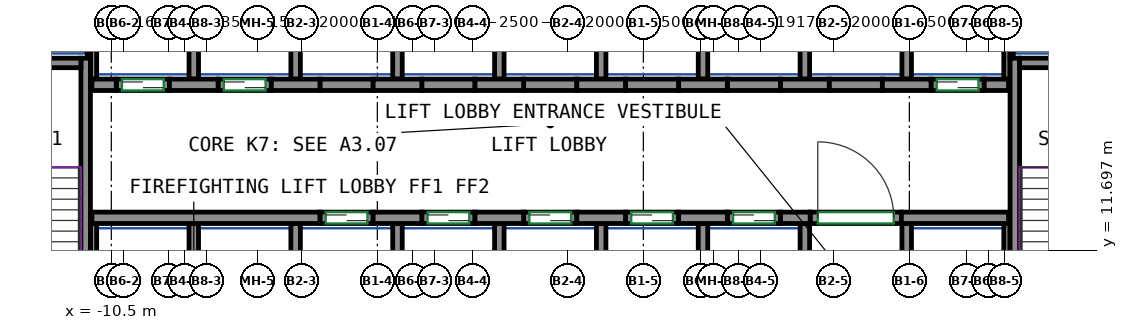
"""IFC4 building model, lengths in metres.
Left out: names, types, materials, properties, quantities, classifications, styles, units other than length and angle.
Written with IfcOpenShell. Run it as: python <this file> out.ifc"""

import sys

from ifc_helpers import new_model, si_unit, direction, frame, frame_2d, origin, place, context, subcontext, project, spatial, rectangle, extrude, source, transform, mapped, element, fill, save


model = new_model("IFC4")
c1 = context("Model", 3, precision=1e-05, world=origin(), true_north=direction((0.0, 1.0)))
c2 = subcontext(c1, "Body", "Model", "MODEL_VIEW")
j1 = project(units=[si_unit("LENGTHUNIT", "METRE"), si_unit("PLANEANGLEUNIT", "RADIAN")], contexts=[c1])
p1 = place(None, origin())
s1 = spatial("IfcSite", under=j1, at=p1, CompositionType="ELEMENT")
p2 = place(p1, origin())
s2 = spatial("IfcBuilding", under=s1, at=p2, CompositionType="ELEMENT")
p3 = place(p2, frame((0.0, 0.0, 31.0)))
s3 = spatial("IfcBuildingStorey", under=s2, at=p3, CompositionType="ELEMENT", Elevation=31.0)
m1 = source(origin(), c2, "Body", "SweptSolid", [
    extrude(rectangle(XDim=7.75, YDim=0.25, at=frame_2d((3.875, 0.0))), origin(), (0.0, 0.0, 1.0), 3.72),
])
p4 = place(p3, frame((-11.175, 9.0, 0.0), z_axis=(0.0, 0.0, 1.0), x_axis=(0.0, 1.0, 0.0)))
e1 = element("IfcWall", 1, at=p4, inside=s3, PredefinedType="SHEAR", context=c2, shape_type="MappedRepresentation", body=[
    mapped(m1, transform((0.0, 0.0, 0.0))),
])
m2 = source(origin(), c2, "Body", "SweptSolid", [
    extrude(rectangle(XDim=3.7, YDim=0.25, at=frame_2d((1.85, 0.0))), origin(), (0.0, 0.0, 1.0), 3.72),
])
p5 = place(p3, frame((-15.0, 16.625, 0.0), z_axis=(0.0, 0.0, 1.0), x_axis=(1.0, 0.0, 0.0)))
e2 = element("IfcWall", 2, at=p5, inside=s3, PredefinedType="SHEAR", context=c2, shape_type="MappedRepresentation", body=[
    mapped(m2, transform((0.0, 0.0, 0.0))),
])
p6 = place(p3, frame((13.275, 9.0, 0.0), z_axis=(0.0, 0.0, 1.0), x_axis=(0.0, 1.0, 0.0)))
e3 = element("IfcWall", 3, at=p6, inside=s3, PredefinedType="SHEAR", context=c2, shape_type="MappedRepresentation", body=[
    mapped(m1, transform((0.0, 0.0, 0.0))),
])
m3 = source(origin(), c2, "Body", "SweptSolid", [
    extrude(rectangle(XDim=3.7, YDim=0.25, at=frame_2d((1.85, 0.0))), origin(), (0.0, 0.0, 1.0), 3.72),
])
p7 = place(p3, frame((13.4, 16.625, 0.0), z_axis=(0.0, 0.0, 1.0), x_axis=(1.0, 0.0, 0.0)))
e4 = element("IfcWall", 4, at=p7, inside=s3, PredefinedType="SHEAR", context=c2, shape_type="MappedRepresentation", body=[
    mapped(m3, transform((0.0, 0.0, 0.0))),
])
m4 = source(origin(), c2, "Body", "SweptSolid", [
    extrude(rectangle(XDim=6.0, YDim=0.3, at=frame_2d((3.0, 0.0))), origin(), (0.0, 0.0, 1.0), 3.72),
])
p8 = place(p3, frame((-11.01, 12.55, 0.0), z_axis=(0.0, 0.0, 1.0), x_axis=(1.0, 0.0, 0.0)))
e5 = element("IfcWall", 5, at=p8, inside=s3, PredefinedType="SHEAR", context=c2, shape_type="MappedRepresentation", body=[
    mapped(m4, transform((0.0, 0.0, 0.0))),
])
m5 = source(origin(), c2, "Body", "SweptSolid", [
    extrude(rectangle(XDim=1.28, YDim=0.3, at=frame_2d((0.64, 0.0))), origin(), (0.0, 0.0, 1.0), 3.72),
])
for number, where, z_axis, x_axis in (
    (6, (-3.61, 12.55, 0.0), (0.0, 0.0, 1.0), (1.0, 0.0, 0.0)),
    (7, (-0.93, 12.55, 0.0), (0.0, 0.0, 1.0), (1.0, 0.0, 0.0)),
    (8, (1.75, 12.55, 0.0), (0.0, 0.0, 1.0), (1.0, 0.0, 0.0)),
    (9, (4.43, 12.55, 0.0), (0.0, 0.0, 1.0), (1.0, 0.0, 0.0)),
):
    element("IfcWall", number, at=place(p3, frame(where, z_axis=z_axis, x_axis=x_axis)), inside=s3, PredefinedType="SHEAR", context=c2, shape_type="MappedRepresentation", body=[
        mapped(m5, transform((0.0, 0.0, 0.0))),
    ])
m6 = source(origin(), c2, "Body", "SweptSolid", [
    extrude(rectangle(XDim=0.78, YDim=0.3, at=frame_2d((0.39, 0.0))), origin(), (0.0, 0.0, 1.0), 3.72),
])
p9 = place(p3, frame((7.11, 12.55, 0.0), z_axis=(0.0, 0.0, 1.0), x_axis=(1.0, 0.0, 0.0)))
e10 = element("IfcWall", 10, at=p9, inside=s3, PredefinedType="SHEAR", context=c2, shape_type="MappedRepresentation", body=[
    mapped(m6, transform((0.0, 0.0, 0.0))),
])
m7 = source(origin(), c2, "Body", "SweptSolid", [
    extrude(rectangle(XDim=2.82, YDim=0.3, at=frame_2d((1.41, 0.0))), origin(), (0.0, 0.0, 1.0), 3.72),
])
p10 = place(p3, frame((10.29, 12.55, 0.0), z_axis=(0.0, 0.0, 1.0), x_axis=(1.0, 0.0, 0.0)))
e11 = element("IfcWall", 11, at=p10, inside=s3, PredefinedType="SHEAR", context=c2, shape_type="MappedRepresentation", body=[
    mapped(m7, transform((0.0, 0.0, 0.0))),
])
m8 = source(origin(), c2, "Body", "SweptSolid", [
    extrude(rectangle(XDim=0.64, YDim=0.3, at=frame_2d((0.32, 0.0))), origin(), (0.0, 0.0, 1.0), 3.72),
])
p11 = place(p3, frame((-11.01, 16.05, 0.0), z_axis=(0.0, 0.0, 1.0), x_axis=(1.0, 0.0, 0.0)))
e12 = element("IfcWall", 12, at=p11, inside=s3, PredefinedType="SHEAR", context=c2, shape_type="MappedRepresentation", body=[
    mapped(m8, transform((0.0, 0.0, 0.0))),
])
for number, where, z_axis, x_axis in (
    (13, (-8.97, 16.05, 0.0), (0.0, 0.0, 1.0), (1.0, 0.0, 0.0)),
    (14, (-6.29, 16.05, 0.0), (0.0, 0.0, 1.0), (1.0, 0.0, 0.0)),
    (15, (-3.61, 16.05, 0.0), (0.0, 0.0, 1.0), (1.0, 0.0, 0.0)),
    (16, (-0.93, 16.05, 0.0), (0.0, 0.0, 1.0), (1.0, 0.0, 0.0)),
    (17, (1.75, 16.05, 0.0), (0.0, 0.0, 1.0), (1.0, 0.0, 0.0)),
    (18, (4.43, 16.05, 0.0), (0.0, 0.0, 1.0), (1.0, 0.0, 0.0)),
):
    element("IfcWall", number, at=place(p3, frame(where, z_axis=z_axis, x_axis=x_axis)), inside=s3, PredefinedType="SHEAR", context=c2, shape_type="MappedRepresentation", body=[
        mapped(m5, transform((0.0, 0.0, 0.0))),
    ])
m9 = source(origin(), c2, "Body", "SweptSolid", [
    extrude(rectangle(XDim=1.28, YDim=0.3, at=frame_2d((0.64, 0.0))), origin(), (0.0, 0.0, 1.0), 3.72),
])
p12 = place(p3, frame((7.11, 16.05, 0.0), z_axis=(0.0, 0.0, 1.0), x_axis=(1.0, 0.0, 0.0)))
e19 = element("IfcWall", 19, at=p12, inside=s3, PredefinedType="SHEAR", context=c2, shape_type="MappedRepresentation", body=[
    mapped(m9, transform((0.0, 0.0, 0.0))),
])
p13 = place(p3, frame((9.79, 16.05, 0.0), z_axis=(0.0, 0.0, 1.0), x_axis=(1.0, 0.0, 0.0)))
e20 = element("IfcWall", 20, at=p13, inside=s3, PredefinedType="SHEAR", context=c2, shape_type="MappedRepresentation", body=[
    mapped(m5, transform((0.0, 0.0, 0.0))),
])
m10 = source(origin(), c2, "Body", "SweptSolid", [
    extrude(rectangle(XDim=0.64, YDim=0.3, at=frame_2d((0.32, 0.0))), origin(), (0.0, 0.0, 1.0), 3.72),
])
p14 = place(p3, frame((12.47, 16.05, 0.0), z_axis=(0.0, 0.0, 1.0), x_axis=(1.0, 0.0, 0.0)))
e21 = element("IfcWall", 21, at=p14, inside=s3, PredefinedType="SHEAR", context=c2, shape_type="MappedRepresentation", body=[
    mapped(m10, transform((0.0, 0.0, 0.0))),
])
m11 = source(origin(), c2, "Body", "SweptSolid", [
    extrude(rectangle(XDim=1.4, YDim=0.3, at=frame_2d((0.7, 0.0))), origin(), (0.0, 0.0, 1.0), 3.72),
])
p15 = place(p3, frame((-5.01, 12.55, 0.0), z_axis=(0.0, 0.0, 1.0), x_axis=(1.0, 0.0, 0.0)))
e22 = element("IfcWall", 22, at=p15, inside=s3, PredefinedType="PARTITIONING", context=c2, shape_type="MappedRepresentation", body=[
    mapped(m11, transform((0.0, 0.0, 0.0))),
])
p16 = place(p15, frame((0.15, 0.0, 0.0)))
e23 = element("IfcOpeningElement", 23, at=p16, cuts=e22, PredefinedType="OPENING", context=c2, shape_type="SweptSolid", body=[
    extrude(rectangle(XDim=1.1, YDim=2.1, at=frame_2d((0.55, 1.05))), frame((0.0, 0.16, 0.0), z_axis=(0.0, -1.0, 0.0), x_axis=(1.0, 0.0, 0.0)), (0.0, 0.0, 1.0), 0.32),
])
m12 = source(origin(), c2, "Body", "SweptSolid", [
    extrude(rectangle(XDim=1.4, YDim=0.3, at=frame_2d((0.7, 0.0))), origin(), (0.0, 0.0, 1.0), 3.72),
])
p17 = place(p3, frame((-2.33, 12.55, 0.0), z_axis=(0.0, 0.0, 1.0), x_axis=(1.0, 0.0, 0.0)))
e24 = element("IfcWall", 24, at=p17, inside=s3, PredefinedType="PARTITIONING", context=c2, shape_type="MappedRepresentation", body=[
    mapped(m12, transform((0.0, 0.0, 0.0))),
])
p18 = place(p17, frame((0.15, 0.0, 0.0)))
e25 = element("IfcOpeningElement", 25, at=p18, cuts=e24, PredefinedType="OPENING", context=c2, shape_type="SweptSolid", body=[
    extrude(rectangle(XDim=1.1, YDim=2.1, at=frame_2d((0.55, 1.05))), frame((0.0, 0.16, 0.0), z_axis=(0.0, -1.0, 0.0), x_axis=(1.0, 0.0, 0.0)), (0.0, 0.0, 1.0), 0.32),
])
p19 = place(p3, frame((0.35, 12.55, 0.0), z_axis=(0.0, 0.0, 1.0), x_axis=(1.0, 0.0, 0.0)))
e26 = element("IfcWall", 26, at=p19, inside=s3, PredefinedType="PARTITIONING", context=c2, shape_type="MappedRepresentation", body=[
    mapped(m11, transform((0.0, 0.0, 0.0))),
])
p20 = place(p19, frame((0.15, 0.0, 0.0)))
e27 = element("IfcOpeningElement", 27, at=p20, cuts=e26, PredefinedType="OPENING", context=c2, shape_type="SweptSolid", body=[
    extrude(rectangle(XDim=1.1, YDim=2.1, at=frame_2d((0.55, 1.05))), frame((0.0, 0.16, 0.0), z_axis=(0.0, -1.0, 0.0), x_axis=(1.0, 0.0, 0.0)), (0.0, 0.0, 1.0), 0.32),
])
p21 = place(p3, frame((3.03, 12.55, 0.0), z_axis=(0.0, 0.0, 1.0), x_axis=(1.0, 0.0, 0.0)))
e28 = element("IfcWall", 28, at=p21, inside=s3, PredefinedType="PARTITIONING", context=c2, shape_type="MappedRepresentation", body=[
    mapped(m11, transform((0.0, 0.0, 0.0))),
])
p22 = place(p21, frame((0.15, 0.0, 0.0)))
e29 = element("IfcOpeningElement", 29, at=p22, cuts=e28, PredefinedType="OPENING", context=c2, shape_type="SweptSolid", body=[
    extrude(rectangle(XDim=1.1, YDim=2.1, at=frame_2d((0.55, 1.05))), frame((0.0, 0.16, 0.0), z_axis=(0.0, -1.0, 0.0), x_axis=(1.0, 0.0, 0.0)), (0.0, 0.0, 1.0), 0.32),
])
p23 = place(p3, frame((5.71, 12.55, 0.0), z_axis=(0.0, 0.0, 1.0), x_axis=(1.0, 0.0, 0.0)))
e30 = element("IfcWall", 30, at=p23, inside=s3, PredefinedType="PARTITIONING", context=c2, shape_type="MappedRepresentation", body=[
    mapped(m12, transform((0.0, 0.0, 0.0))),
])
p24 = place(p23, frame((0.15, 0.0, 0.0)))
e31 = element("IfcOpeningElement", 31, at=p24, cuts=e30, PredefinedType="OPENING", context=c2, shape_type="SweptSolid", body=[
    extrude(rectangle(XDim=1.1, YDim=2.1, at=frame_2d((0.55, 1.05))), frame((0.0, 0.16, 0.0), z_axis=(0.0, -1.0, 0.0), x_axis=(1.0, 0.0, 0.0)), (0.0, 0.0, 1.0), 0.32),
])
p25 = place(p3, frame((11.07, 16.05, 0.0), z_axis=(0.0, 0.0, 1.0), x_axis=(1.0, 0.0, 0.0)))
e32 = element("IfcWall", 32, at=p25, inside=s3, PredefinedType="PARTITIONING", context=c2, shape_type="MappedRepresentation", body=[
    mapped(m11, transform((0.0, 0.0, 0.0))),
])
p26 = place(p25, frame((0.15, 0.0, 0.0)))
e33 = element("IfcOpeningElement", 33, at=p26, cuts=e32, PredefinedType="OPENING", context=c2, shape_type="SweptSolid", body=[
    extrude(rectangle(XDim=1.1, YDim=2.1, at=frame_2d((0.55, 1.05))), frame((0.0, 0.16, 0.0), z_axis=(0.0, -1.0, 0.0), x_axis=(1.0, 0.0, 0.0)), (0.0, 0.0, 1.0), 0.32),
])
p27 = place(p3, frame((-10.37, 16.05, 0.0), z_axis=(0.0, 0.0, 1.0), x_axis=(1.0, 0.0, 0.0)))
e34 = element("IfcWall", 34, at=p27, inside=s3, PredefinedType="PARTITIONING", context=c2, shape_type="MappedRepresentation", body=[
    mapped(m12, transform((0.0, 0.0, 0.0))),
])
p28 = place(p27, frame((0.15, 0.0, 0.0)))
e35 = element("IfcOpeningElement", 35, at=p28, cuts=e34, PredefinedType="OPENING", context=c2, shape_type="SweptSolid", body=[
    extrude(rectangle(XDim=1.1, YDim=2.1, at=frame_2d((0.55, 1.05))), frame((0.0, 0.16, 0.0), z_axis=(0.0, -1.0, 0.0), x_axis=(1.0, 0.0, 0.0)), (0.0, 0.0, 1.0), 0.32),
])
p29 = place(p3, frame((-7.69, 16.05, 0.0), z_axis=(0.0, 0.0, 1.0), x_axis=(1.0, 0.0, 0.0)))
e36 = element("IfcWall", 36, at=p29, inside=s3, PredefinedType="PARTITIONING", context=c2, shape_type="MappedRepresentation", body=[
    mapped(m11, transform((0.0, 0.0, 0.0))),
])
p30 = place(p29, frame((0.15, 0.0, 0.0)))
e37 = element("IfcOpeningElement", 37, at=p30, cuts=e36, PredefinedType="OPENING", context=c2, shape_type="SweptSolid", body=[
    extrude(rectangle(XDim=1.1, YDim=2.1, at=frame_2d((0.55, 1.05))), frame((0.0, 0.16, 0.0), z_axis=(0.0, -1.0, 0.0), x_axis=(1.0, 0.0, 0.0)), (0.0, 0.0, 1.0), 0.32),
])
m13 = source(origin(), c2, "Body", "SweptSolid", [
    extrude(rectangle(XDim=2.4, YDim=0.3, at=frame_2d((1.2, 0.0))), origin(), (0.0, 0.0, 1.0), 3.72),
])
p31 = place(p3, frame((7.89, 12.55, 0.0), z_axis=(0.0, 0.0, 1.0), x_axis=(1.0, 0.0, 0.0)))
e38 = element("IfcWall", 38, at=p31, inside=s3, PredefinedType="PARTITIONING", context=c2, shape_type="MappedRepresentation", body=[
    mapped(m13, transform((0.0, 0.0, 0.0))),
])
p32 = place(p31, frame((0.2, 0.0, 0.0)))
e39 = element("IfcOpeningElement", 39, at=p32, cuts=e38, PredefinedType="OPENING", context=c2, shape_type="SweptSolid", body=[
    extrude(rectangle(XDim=2.0, YDim=2.1, at=frame_2d((1.0, 1.05))), frame((0.0, 0.16, 0.0), z_axis=(0.0, -1.0, 0.0), x_axis=(1.0, 0.0, 0.0)), (0.0, 0.0, 1.0), 0.32),
])
p33 = place(p3, frame((-5.01, 16.05, 0.0), z_axis=(0.0, 0.0, 1.0), x_axis=(1.0, 0.0, 0.0)))
e40 = element("IfcWall", 40, at=p33, inside=s3, PredefinedType="PARTITIONING", context=c2, shape_type="MappedRepresentation", body=[
    mapped(m11, transform((0.0, 0.0, 0.0))),
])
p34 = place(p3, frame((-2.33, 16.05, 0.0), z_axis=(0.0, 0.0, 1.0), x_axis=(1.0, 0.0, 0.0)))
e41 = element("IfcWall", 41, at=p34, inside=s3, PredefinedType="PARTITIONING", context=c2, shape_type="MappedRepresentation", body=[
    mapped(m12, transform((0.0, 0.0, 0.0))),
])
for number, where, z_axis, x_axis in (
    (42, (0.35, 16.05, 0.0), (0.0, 0.0, 1.0), (1.0, 0.0, 0.0)),
    (43, (3.03, 16.05, 0.0), (0.0, 0.0, 1.0), (1.0, 0.0, 0.0)),
):
    element("IfcWall", number, at=place(p3, frame(where, z_axis=z_axis, x_axis=x_axis)), inside=s3, PredefinedType="PARTITIONING", context=c2, shape_type="MappedRepresentation", body=[
        mapped(m11, transform((0.0, 0.0, 0.0))),
    ])
for number, where, z_axis, x_axis in (
    (44, (5.71, 16.05, 0.0), (0.0, 0.0, 1.0), (1.0, 0.0, 0.0)),
    (45, (8.39, 16.05, 0.0), (0.0, 0.0, 1.0), (1.0, 0.0, 0.0)),
):
    element("IfcWall", number, at=place(p3, frame(where, z_axis=z_axis, x_axis=x_axis)), inside=s3, PredefinedType="PARTITIONING", context=c2, shape_type="MappedRepresentation", body=[
        mapped(m12, transform((0.0, 0.0, 0.0))),
    ])
m14 = source(origin(), c2, "Body", "SweptSolid", [
    extrude(rectangle(XDim=3.275, YDim=0.165, at=frame_2d((1.638, 0.0))), origin(), (0.0, 0.0, 1.0), 3.72),
])
for number, where, z_axis, x_axis in (
    (46, (13.067, 16.2, 0.0), (0.0, 0.0, 1.0), (0.0, 1.0, 0.0)),
    (47, (-10.968, 16.2, 0.0), (0.0, 0.0, 1.0), (0.0, 1.0, 0.0)),
):
    element("IfcWall", number, at=place(p3, frame(where, z_axis=z_axis, x_axis=x_axis)), inside=s3, PredefinedType="PARTITIONING", context=c2, shape_type="MappedRepresentation", body=[
        mapped(m14, transform((0.0, 0.0, 0.0))),
    ])
m15 = source(origin(), c2, "Body", "SweptSolid", [
    extrude(rectangle(XDim=3.275, YDim=0.25, at=frame_2d((1.638, 0.0))), origin(), (0.0, 0.0, 1.0), 3.72),
])
p35 = place(p3, frame((10.43, 16.2, 0.0), z_axis=(0.0, 0.0, 1.0), x_axis=(0.0, 1.0, 0.0)))
e48 = element("IfcWall", 48, at=p35, inside=s3, PredefinedType="PARTITIONING", context=c2, shape_type="MappedRepresentation", body=[
    mapped(m15, transform((0.0, 0.0, 0.0))),
])
m16 = source(origin(), c2, "Body", "SweptSolid", [
    extrude(rectangle(XDim=2.725, YDim=0.085, at=frame_2d((1.363, 0.0))), origin(), (0.0, 0.0, 1.0), 3.72),
])
p36 = place(p3, frame((13.192, 16.75, 0.0), z_axis=(0.0, 0.0, 1.0), x_axis=(0.0, 1.0, 0.0)))
e49 = element("IfcWall", 49, at=p36, inside=s3, PredefinedType="PARTITIONING", context=c2, shape_type="MappedRepresentation", body=[
    mapped(m16, transform((0.0, 0.0, 0.0))),
])
for number, where, z_axis, x_axis in (
    (50, (2.39, 16.2, 0.0), (0.0, 0.0, 1.0), (0.0, 1.0, 0.0)),
    (51, (5.07, 16.2, 0.0), (0.0, 0.0, 1.0), (0.0, 1.0, 0.0)),
    (52, (7.75, 16.2, 0.0), (0.0, 0.0, 1.0), (0.0, 1.0, 0.0)),
    (53, (-0.29, 16.2, 0.0), (0.0, 0.0, 1.0), (0.0, 1.0, 0.0)),
):
    element("IfcWall", number, at=place(p3, frame(where, z_axis=z_axis, x_axis=x_axis)), inside=s3, PredefinedType="PARTITIONING", context=c2, shape_type="MappedRepresentation", body=[
        mapped(m15, transform((0.0, 0.0, 0.0))),
    ])
p37 = place(p3, frame((-11.093, 16.75, 0.0), z_axis=(0.0, 0.0, 1.0), x_axis=(0.0, 1.0, 0.0)))
e54 = element("IfcWall", 54, at=p37, inside=s3, PredefinedType="PARTITIONING", context=c2, shape_type="MappedRepresentation", body=[
    mapped(m16, transform((0.0, 0.0, 0.0))),
])
for number, where, z_axis, x_axis in (
    (55, (-2.97, 16.2, 0.0), (0.0, 0.0, 1.0), (0.0, 1.0, 0.0)),
    (56, (-5.65, 16.2, 0.0), (0.0, 0.0, 1.0), (0.0, 1.0, 0.0)),
    (57, (-8.33, 16.2, 0.0), (0.0, 0.0, 1.0), (0.0, 1.0, 0.0)),
):
    element("IfcWall", number, at=place(p3, frame(where, z_axis=z_axis, x_axis=x_axis)), inside=s3, PredefinedType="PARTITIONING", context=c2, shape_type="MappedRepresentation", body=[
        mapped(m15, transform((0.0, 0.0, 0.0))),
    ])
m17 = source(origin(), c2, "Body", "SweptSolid", [
    extrude(rectangle(XDim=3.4, YDim=0.25, at=frame_2d((1.7, 0.0))), origin(), (0.0, 0.0, 1.0), 3.72),
])
p38 = place(p3, frame((10.43, 9.0, 0.0), z_axis=(0.0, 0.0, 1.0), x_axis=(0.0, 1.0, 0.0)))
e58 = element("IfcWall", 58, at=p38, inside=s3, PredefinedType="PARTITIONING", context=c2, shape_type="MappedRepresentation", body=[
    mapped(m17, transform((0.0, 0.0, 0.0))),
])
m18 = source(origin(), c2, "Body", "SweptSolid", [
    extrude(rectangle(XDim=3.4, YDim=0.165, at=frame_2d((1.7, 0.0))), origin(), (0.0, 0.0, 1.0), 3.72),
])
p39 = place(p3, frame((13.067, 9.0, 0.0), z_axis=(0.0, 0.0, 1.0), x_axis=(0.0, 1.0, 0.0)))
e59 = element("IfcWall", 59, at=p39, inside=s3, PredefinedType="PARTITIONING", context=c2, shape_type="MappedRepresentation", body=[
    mapped(m18, transform((0.0, 0.0, 0.0))),
])
for number, where, z_axis, x_axis in (
    (60, (2.39, 9.0, 0.0), (0.0, 0.0, 1.0), (0.0, 1.0, 0.0)),
    (61, (5.07, 9.0, 0.0), (0.0, 0.0, 1.0), (0.0, 1.0, 0.0)),
    (62, (7.75, 9.0, 0.0), (0.0, 0.0, 1.0), (0.0, 1.0, 0.0)),
    (63, (-0.29, 9.0, 0.0), (0.0, 0.0, 1.0), (0.0, 1.0, 0.0)),
):
    element("IfcWall", number, at=place(p3, frame(where, z_axis=z_axis, x_axis=x_axis)), inside=s3, PredefinedType="PARTITIONING", context=c2, shape_type="MappedRepresentation", body=[
        mapped(m17, transform((0.0, 0.0, 0.0))),
    ])
p40 = place(p3, frame((-10.968, 9.0, 0.0), z_axis=(0.0, 0.0, 1.0), x_axis=(0.0, 1.0, 0.0)))
e64 = element("IfcWall", 64, at=p40, inside=s3, PredefinedType="PARTITIONING", context=c2, shape_type="MappedRepresentation", body=[
    mapped(m18, transform((0.0, 0.0, 0.0))),
])
for number, where, z_axis, x_axis in (
    (65, (-2.97, 9.0, 0.0), (0.0, 0.0, 1.0), (0.0, 1.0, 0.0)),
    (66, (-5.65, 9.0, 0.0), (0.0, 0.0, 1.0), (0.0, 1.0, 0.0)),
    (67, (-8.33, 9.0, 0.0), (0.0, 0.0, 1.0), (0.0, 1.0, 0.0)),
):
    element("IfcWall", number, at=place(p3, frame(where, z_axis=z_axis, x_axis=x_axis)), inside=s3, PredefinedType="PARTITIONING", context=c2, shape_type="MappedRepresentation", body=[
        mapped(m17, transform((0.0, 0.0, 0.0))),
    ])
p41 = place(p32, origin())
e68 = element("IfcDoor", 68, at=p41, inside=s3, OperationType="DOUBLE_DOOR_SINGLE_SWING", PredefinedType="DOOR", context=c2, shape_type="SweptSolid", body=[
    extrude(rectangle(XDim=2.0, YDim=2.1, at=frame_2d((1.0, 1.05))), frame((0.0, 0.025, 0.0), z_axis=(0.0, -1.0, 0.0), x_axis=(1.0, 0.0, 0.0)), (0.0, 0.0, 1.0), 0.05),
])
fill(e39, e68)
p42 = place(p16, origin())
e69 = element("IfcDoor", 69, at=p42, inside=s3, OperationType="DOUBLE_DOOR_SLIDING", PredefinedType="DOOR", context=c2, shape_type="SweptSolid", body=[
    extrude(rectangle(XDim=1.1, YDim=2.1, at=frame_2d((0.55, 1.05))), frame((0.0, 0.025, 0.0), z_axis=(0.0, -1.0, 0.0), x_axis=(1.0, 0.0, 0.0)), (0.0, 0.0, 1.0), 0.05),
])
fill(e23, e69)
p43 = place(p18, origin())
e70 = element("IfcDoor", 70, at=p43, inside=s3, OperationType="DOUBLE_DOOR_SLIDING", PredefinedType="DOOR", context=c2, shape_type="SweptSolid", body=[
    extrude(rectangle(XDim=1.1, YDim=2.1, at=frame_2d((0.55, 1.05))), frame((0.0, 0.025, 0.0), z_axis=(0.0, -1.0, 0.0), x_axis=(1.0, 0.0, 0.0)), (0.0, 0.0, 1.0), 0.05),
])
fill(e25, e70)
p44 = place(p20, origin())
e71 = element("IfcDoor", 71, at=p44, inside=s3, OperationType="DOUBLE_DOOR_SLIDING", PredefinedType="DOOR", context=c2, shape_type="SweptSolid", body=[
    extrude(rectangle(XDim=1.1, YDim=2.1, at=frame_2d((0.55, 1.05))), frame((0.0, 0.025, 0.0), z_axis=(0.0, -1.0, 0.0), x_axis=(1.0, 0.0, 0.0)), (0.0, 0.0, 1.0), 0.05),
])
fill(e27, e71)
p45 = place(p22, origin())
e72 = element("IfcDoor", 72, at=p45, inside=s3, OperationType="DOUBLE_DOOR_SLIDING", PredefinedType="DOOR", context=c2, shape_type="SweptSolid", body=[
    extrude(rectangle(XDim=1.1, YDim=2.1, at=frame_2d((0.55, 1.05))), frame((0.0, 0.025, 0.0), z_axis=(0.0, -1.0, 0.0), x_axis=(1.0, 0.0, 0.0)), (0.0, 0.0, 1.0), 0.05),
])
fill(e29, e72)
p46 = place(p24, origin())
e73 = element("IfcDoor", 73, at=p46, inside=s3, OperationType="DOUBLE_DOOR_SLIDING", PredefinedType="DOOR", context=c2, shape_type="SweptSolid", body=[
    extrude(rectangle(XDim=1.1, YDim=2.1, at=frame_2d((0.55, 1.05))), frame((0.0, 0.025, 0.0), z_axis=(0.0, -1.0, 0.0), x_axis=(1.0, 0.0, 0.0)), (0.0, 0.0, 1.0), 0.05),
])
fill(e31, e73)
p47 = place(p26, origin())
e74 = element("IfcDoor", 74, at=p47, inside=s3, OperationType="DOUBLE_DOOR_SLIDING", PredefinedType="DOOR", context=c2, shape_type="SweptSolid", body=[
    extrude(rectangle(XDim=1.1, YDim=2.1, at=frame_2d((0.55, 1.05))), frame((0.0, 0.025, 0.0), z_axis=(0.0, -1.0, 0.0), x_axis=(1.0, 0.0, 0.0)), (0.0, 0.0, 1.0), 0.05),
])
fill(e33, e74)
p48 = place(p28, origin())
e75 = element("IfcDoor", 75, at=p48, inside=s3, OperationType="DOUBLE_DOOR_SLIDING", PredefinedType="DOOR", context=c2, shape_type="SweptSolid", body=[
    extrude(rectangle(XDim=1.1, YDim=2.1, at=frame_2d((0.55, 1.05))), frame((0.0, 0.025, 0.0), z_axis=(0.0, -1.0, 0.0), x_axis=(1.0, 0.0, 0.0)), (0.0, 0.0, 1.0), 0.05),
])
fill(e35, e75)
p49 = place(p30, origin())
e76 = element("IfcDoor", 76, at=p49, inside=s3, OperationType="DOUBLE_DOOR_SLIDING", PredefinedType="DOOR", context=c2, shape_type="SweptSolid", body=[
    extrude(rectangle(XDim=1.1, YDim=2.1, at=frame_2d((0.55, 1.05))), frame((0.0, 0.025, 0.0), z_axis=(0.0, -1.0, 0.0), x_axis=(1.0, 0.0, 0.0)), (0.0, 0.0, 1.0), 0.05),
])
fill(e37, e76)
save(model, sys.argv[1])
